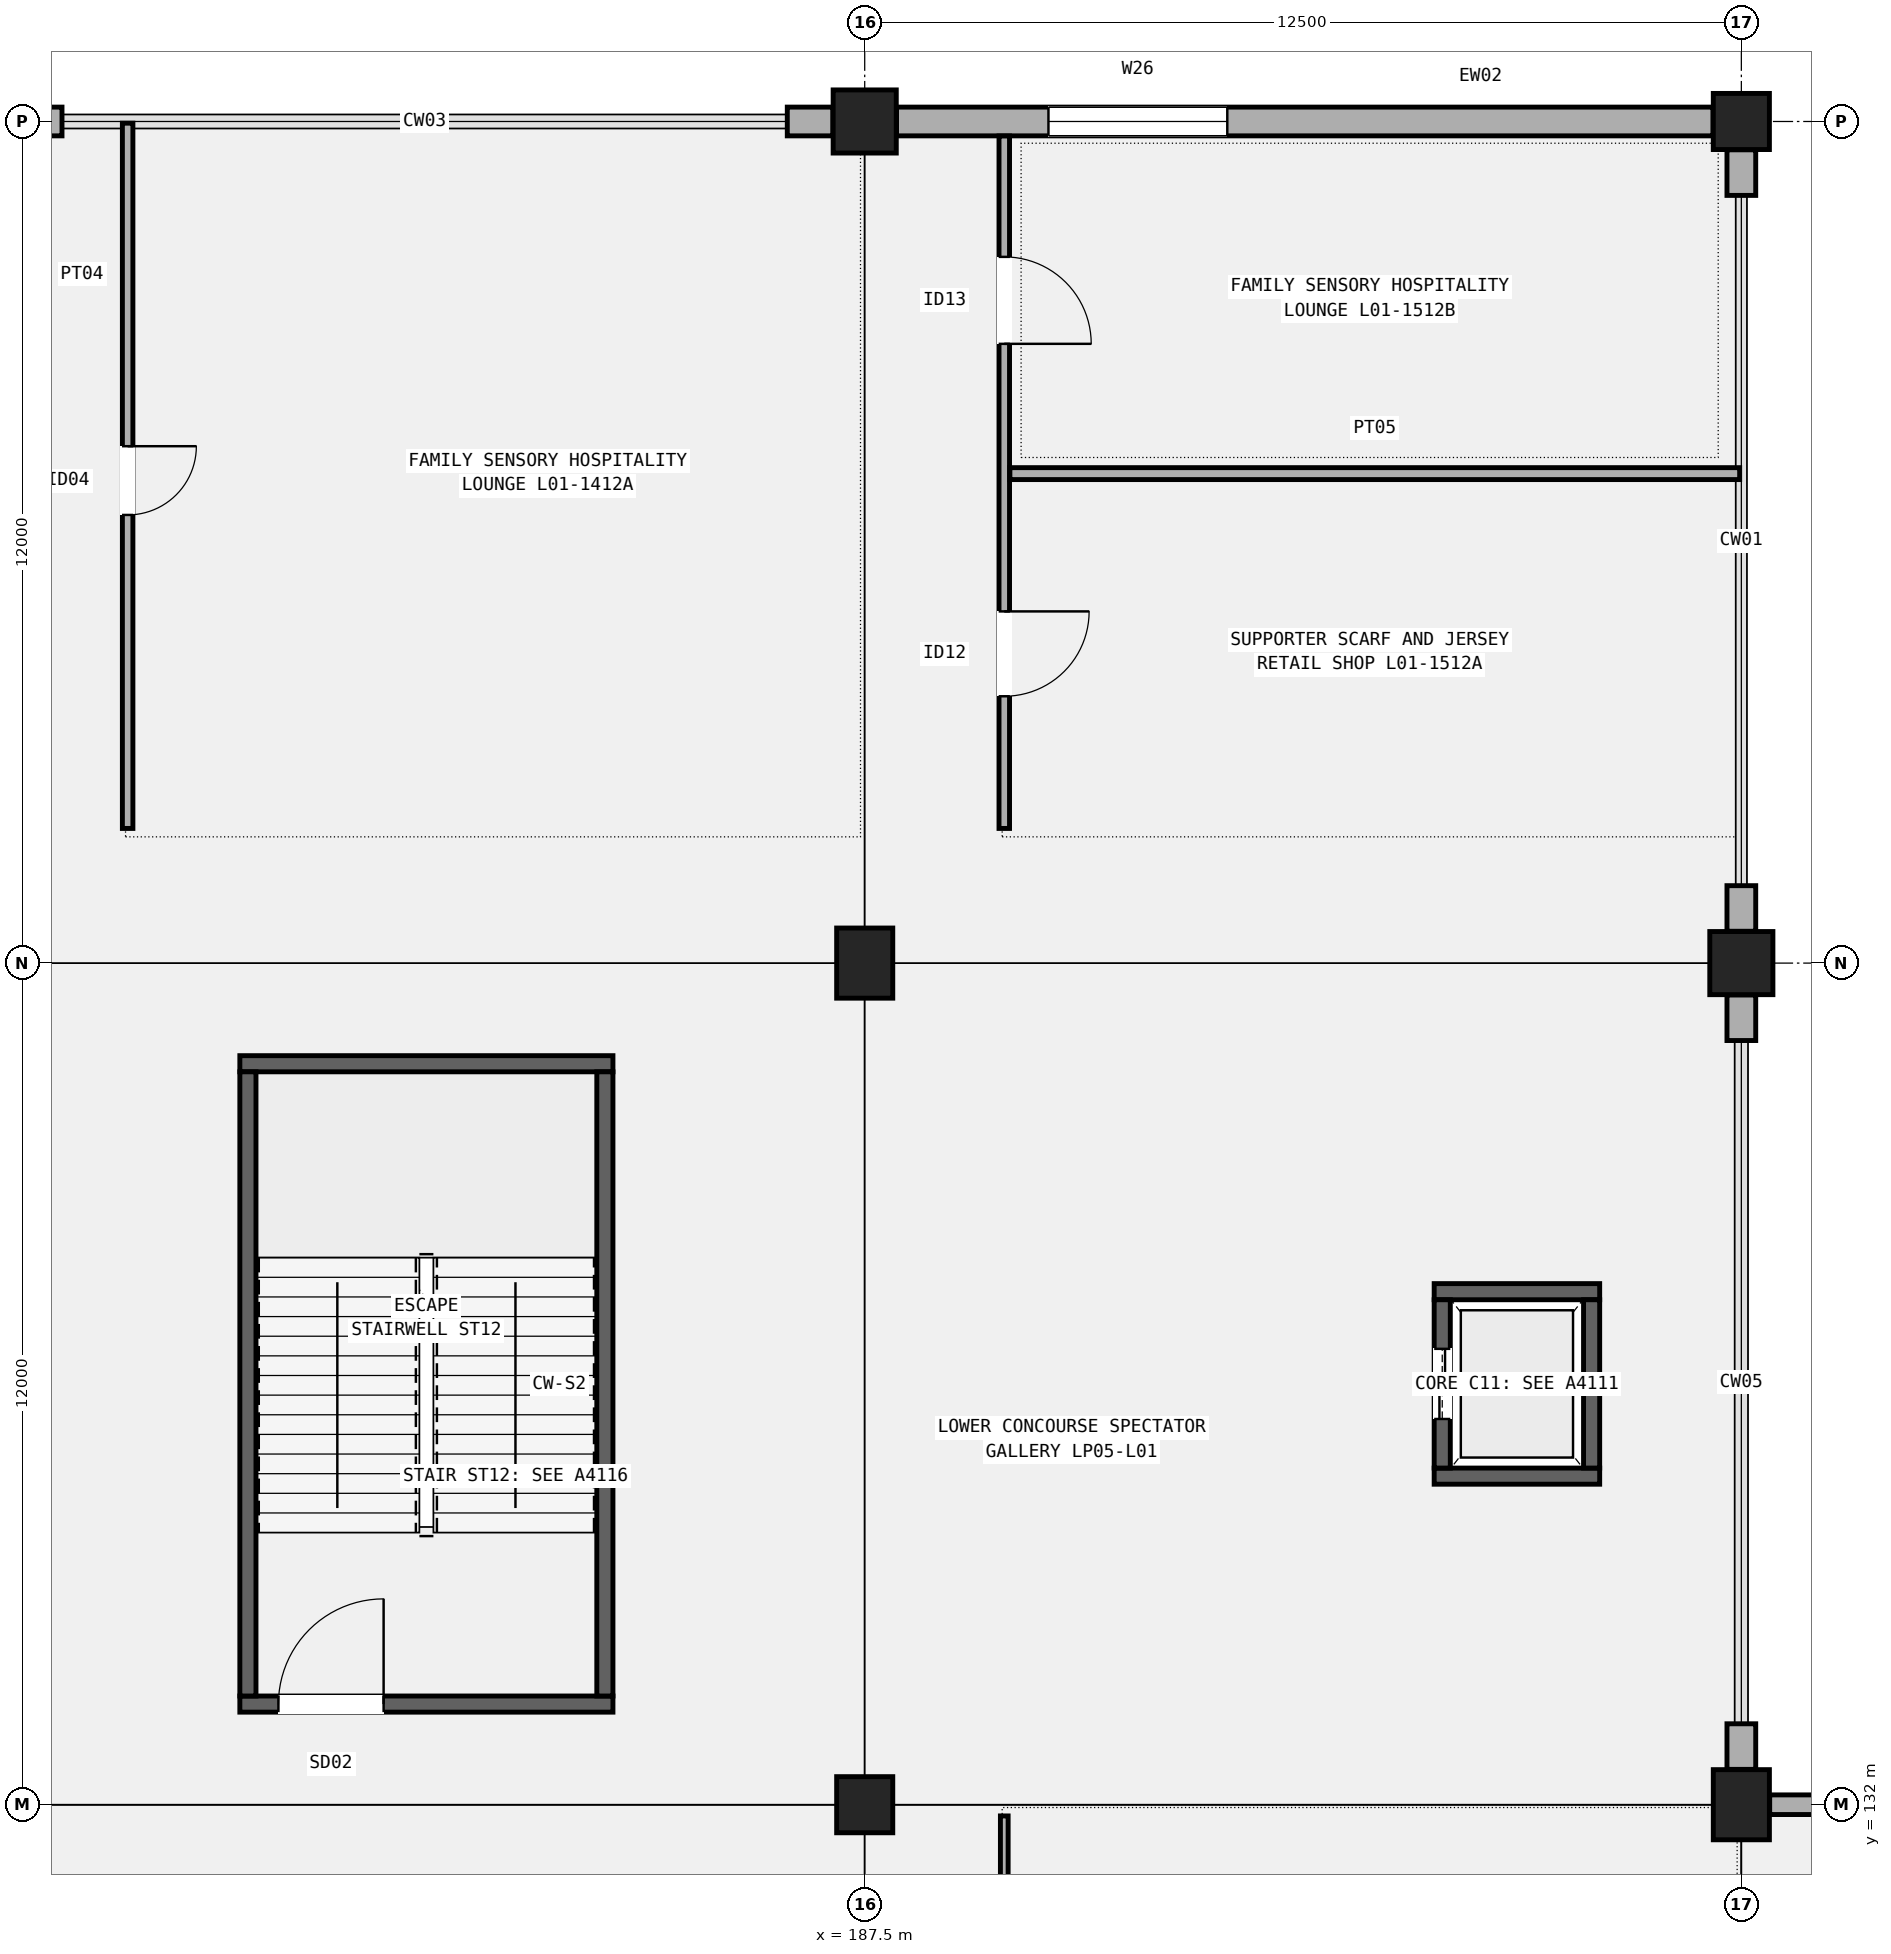
"""IFC4 building model, lengths in metres.
Left out: names, types, materials, properties, quantities, classifications, styles, units other than length and angle.
Written with IfcOpenShell. Run it as: python <this file> out.ifc"""

import sys

from ifc_helpers import new_model, si_unit, direction, frame, frame_2d, origin, origin_2d, place, context, subcontext, project, spatial, rectangle, extrude, element, fill, save


model = new_model("IFC4")
c1 = context("Model", 3, precision=1e-05, world=origin(), true_north=direction((0.0, 1.0)))
c2 = subcontext(c1, "Body", "Model", "MODEL_VIEW")
j1 = project(units=[si_unit("LENGTHUNIT", "METRE"), si_unit("PLANEANGLEUNIT", "RADIAN")], contexts=[c1])
p1 = place(None, origin())
s1 = spatial("IfcSite", under=j1, at=p1, CompositionType="ELEMENT")
p2 = place(p1, origin())
s2 = spatial("IfcBuilding", under=s1, at=p2, CompositionType="ELEMENT")
p3 = place(p2, frame((0.0, 0.0, 5.4)))
s3 = spatial("IfcBuildingStorey", under=s2, at=p3, CompositionType="ELEMENT", Elevation=5.4)
p4 = place(p3, frame((187.5, 132.0, 0.0), z_axis=(0.0, 0.0, 1.0), x_axis=(1.0, 0.0, 0.0)))
e1 = element("IfcColumn", 1, at=p4, inside=s3, PredefinedType="COLUMN", context=c2, shape_type="SweptSolid", body=[
    extrude(rectangle(XDim=0.8, YDim=0.8, at=origin_2d()), origin(), (0.0, 0.0, 1.0), 4.8),
])
p5 = place(p3, frame((187.5, 144.0, 0.0), z_axis=(0.0, 0.0, 1.0), x_axis=(1.0, 0.0, 0.0)))
e2 = element("IfcColumn", 2, at=p5, inside=s3, PredefinedType="COLUMN", context=c2, shape_type="SweptSolid", body=[
    extrude(rectangle(XDim=0.8, YDim=1.0, at=origin_2d()), origin(), (0.0, 0.0, 1.0), 4.8),
])
p6 = place(p3, frame((187.5, 156.0, 0.0), z_axis=(0.0, 0.0, 1.0), x_axis=(1.0, 0.0, 0.0)))
e3 = element("IfcColumn", 3, at=p6, inside=s3, PredefinedType="COLUMN", context=c2, shape_type="SweptSolid", body=[
    extrude(rectangle(XDim=0.9, YDim=0.9, at=origin_2d()), origin(), (0.0, 0.0, 1.0), 4.8),
])
p7 = place(p3, frame((200.0, 132.0, 0.0), z_axis=(0.0, 0.0, 1.0), x_axis=(1.0, 0.0, 0.0)))
e4 = element("IfcColumn", 4, at=p7, inside=s3, PredefinedType="COLUMN", context=c2, shape_type="SweptSolid", body=[
    extrude(rectangle(XDim=0.8, YDim=1.0, at=origin_2d()), origin(), (0.0, 0.0, 1.0), 4.8),
])
p8 = place(p3, frame((200.0, 144.0, 0.0), z_axis=(0.0, 0.0, 1.0), x_axis=(1.0, 0.0, 0.0)))
e5 = element("IfcColumn", 5, at=p8, inside=s3, PredefinedType="COLUMN", context=c2, shape_type="SweptSolid", body=[
    extrude(rectangle(XDim=0.9, YDim=0.9, at=origin_2d()), origin(), (0.0, 0.0, 1.0), 4.8),
])
p9 = place(p3, frame((200.0, 156.0, 0.0), z_axis=(0.0, 0.0, 1.0), x_axis=(1.0, 0.0, 0.0)))
e6 = element("IfcColumn", 6, at=p9, inside=s3, PredefinedType="COLUMN", context=c2, shape_type="SweptSolid", body=[
    extrude(rectangle(XDim=0.8, YDim=0.8, at=origin_2d()), origin(), (0.0, 0.0, 1.0), 4.8),
])
for number, where, z_axis, x_axis in (
    (7, (175.404, 156.0, 0.0), (0.0, 0.0, 1.0), (1.0, 0.0, 0.0)),
    (8, (186.396, 156.0, 0.0), (0.0, 0.0, 1.0), (1.0, 0.0, 0.0)),
):
    element("IfcWall", number, at=place(p3, frame(where, z_axis=z_axis, x_axis=x_axis)), inside=s3, PredefinedType="SOLIDWALL", context=c2, shape_type="SweptSolid", body=[
        extrude(rectangle(XDim=0.65, YDim=0.41, at=frame_2d((0.325, 0.0))), origin(), (0.0, 0.0, 1.0), 4.2),
    ])
p10 = place(p3, frame((200.0, 132.504, 0.0), z_axis=(0.0, 0.0, 1.0), x_axis=(0.0, 1.0, 0.0)))
e9 = element("IfcWall", 9, at=p10, inside=s3, PredefinedType="SOLIDWALL", context=c2, shape_type="SweptSolid", body=[
    extrude(rectangle(XDim=0.65, YDim=0.41, at=frame_2d((0.325, 0.0))), origin(), (0.0, 0.0, 1.0), 4.2),
])
p11 = place(p3, frame((200.0, 142.896, 0.0), z_axis=(0.0, 0.0, 1.0), x_axis=(0.0, 1.0, 0.0)))
e10 = element("IfcWall", 10, at=p11, inside=s3, PredefinedType="SOLIDWALL", context=c2, shape_type="SweptSolid", body=[
    extrude(rectangle(XDim=0.65, YDim=0.41, at=frame_2d((0.325, 0.0))), origin(), (0.0, 0.0, 1.0), 4.2),
])
p12 = place(p3, frame((187.954, 156.0, 0.0), z_axis=(0.0, 0.0, 1.0), x_axis=(1.0, 0.0, 0.0)))
e11 = element("IfcWall", 11, at=p12, inside=s3, PredefinedType="SOLIDWALL", context=c2, shape_type="SweptSolid", body=[
    extrude(rectangle(XDim=11.642, YDim=0.41, at=frame_2d((5.821, 0.0))), origin(), (0.0, 0.0, 1.0), 4.15),
])
p13 = place(p12, frame((2.166, 0.0, 0.95)))
e12 = element("IfcOpeningElement", 12, at=p13, cuts=e11, PredefinedType="OPENING", context=c2, shape_type="SweptSolid", body=[
    extrude(rectangle(XDim=2.55, YDim=1.95, at=frame_2d((1.275, 0.975))), frame((0.0, 0.215, 0.0), z_axis=(0.0, -1.0, 0.0), x_axis=(1.0, 0.0, 0.0)), (0.0, 0.0, 1.0), 0.43),
])
for number, where, z_axis, x_axis in (
    (13, (200.0, 144.454, 0.0), (0.0, 0.0, 1.0), (0.0, 1.0, 0.0)),
    (14, (200.0, 154.946, 0.0), (0.0, 0.0, 1.0), (0.0, 1.0, 0.0)),
):
    element("IfcWall", number, at=place(p3, frame(where, z_axis=z_axis, x_axis=x_axis)), inside=s3, PredefinedType="SOLIDWALL", context=c2, shape_type="SweptSolid", body=[
        extrude(rectangle(XDim=0.65, YDim=0.41, at=frame_2d((0.325, 0.0))), origin(), (0.0, 0.0, 1.0), 4.15),
    ])
p14 = place(p3, frame((200.404, 132.0, 0.0), z_axis=(0.0, 0.0, 1.0), x_axis=(1.0, 0.0, 0.0)))
e15 = element("IfcWall", 15, at=p14, inside=s3, PredefinedType="SOLIDWALL", context=c2, shape_type="SweptSolid", body=[
    extrude(rectangle(XDim=11.142, YDim=0.28, at=frame_2d((5.571, 0.0))), origin(), (0.0, 0.0, 1.0), 4.2),
])
p15 = place(p14, frame((2.216, 0.0, 0.95)))
e16 = element("IfcOpeningElement", 16, at=p15, cuts=e15, PredefinedType="OPENING", context=c2, shape_type="SweptSolid", body=[
    extrude(rectangle(XDim=3.0, YDim=2.15, at=frame_2d((1.5, 1.075))), frame((0.0, 0.15, 0.0), z_axis=(0.0, -1.0, 0.0), x_axis=(1.0, 0.0, 0.0)), (0.0, 0.0, 1.0), 0.3),
])
p16 = place(p3, frame((178.59, 133.435, 0.0), z_axis=(0.0, 0.0, 1.0), x_axis=(1.0, 0.0, 0.0)))
e17 = element("IfcWall", 17, at=p16, inside=s3, PredefinedType="SHEAR", context=c2, shape_type="SweptSolid", body=[
    extrude(rectangle(XDim=5.32, YDim=0.23, at=frame_2d((2.66, 0.0))), origin(), (0.0, 0.0, 1.0), 4.55),
])
p17 = place(p16, frame((0.55, 0.0, 0.0)))
e18 = element("IfcOpeningElement", 18, at=p17, cuts=e17, PredefinedType="OPENING", context=c2, shape_type="SweptSolid", body=[
    extrude(rectangle(XDim=1.5, YDim=2.2, at=frame_2d((0.75, 1.1))), frame((0.0, 0.125, 0.0), z_axis=(0.0, -1.0, 0.0), x_axis=(1.0, 0.0, 0.0)), (0.0, 0.0, 1.0), 0.25),
])
p18 = place(p3, frame((178.59, 142.565, 0.0), z_axis=(0.0, 0.0, 1.0), x_axis=(1.0, 0.0, 0.0)))
e19 = element("IfcWall", 19, at=p18, inside=s3, PredefinedType="SHEAR", context=c2, shape_type="SweptSolid", body=[
    extrude(rectangle(XDim=5.32, YDim=0.23, at=frame_2d((2.66, 0.0))), origin(), (0.0, 0.0, 1.0), 4.55),
])
for number, where, z_axis, x_axis in (
    (20, (178.705, 133.55, 0.0), (0.0, 0.0, 1.0), (0.0, 1.0, 0.0)),
    (21, (183.795, 133.55, 0.0), (0.0, 0.0, 1.0), (0.0, 1.0, 0.0)),
):
    element("IfcWall", number, at=place(p3, frame(where, z_axis=z_axis, x_axis=x_axis)), inside=s3, PredefinedType="SHEAR", context=c2, shape_type="SweptSolid", body=[
        extrude(rectangle(XDim=8.9, YDim=0.23, at=frame_2d((4.45, 0.0))), origin(), (0.0, 0.0, 1.0), 4.55),
    ])
for number, where, z_axis, x_axis in (
    (22, (195.62, 136.685, 0.0), (0.0, 0.0, 1.0), (1.0, 0.0, 0.0)),
    (23, (195.62, 139.315, 0.0), (0.0, 0.0, 1.0), (1.0, 0.0, 0.0)),
):
    element("IfcWall", number, at=place(p3, frame(where, z_axis=z_axis, x_axis=x_axis)), inside=s3, PredefinedType="SHEAR", context=c2, shape_type="SweptSolid", body=[
        extrude(rectangle(XDim=2.36, YDim=0.23, at=frame_2d((1.18, 0.0))), origin(), (0.0, 0.0, 1.0), 4.55),
    ])
p19 = place(p3, frame((195.735, 136.8, 0.0), z_axis=(0.0, 0.0, 1.0), x_axis=(0.0, 1.0, 0.0)))
e24 = element("IfcWall", 24, at=p19, inside=s3, PredefinedType="SHEAR", context=c2, shape_type="SweptSolid", body=[
    extrude(rectangle(XDim=2.4, YDim=0.23, at=frame_2d((1.2, 0.0))), origin(), (0.0, 0.0, 1.0), 4.55),
])
p20 = place(p19, frame((0.7, 0.0, 0.0)))
e25 = element("IfcOpeningElement", 25, at=p20, cuts=e24, PredefinedType="OPENING", context=c2, shape_type="SweptSolid", body=[
    extrude(rectangle(XDim=1.0, YDim=2.15, at=frame_2d((0.5, 1.075))), frame((0.0, 0.125, 0.0), z_axis=(0.0, -1.0, 0.0), x_axis=(1.0, 0.0, 0.0)), (0.0, 0.0, 1.0), 0.25),
])
p21 = place(p3, frame((197.865, 136.8, 0.0), z_axis=(0.0, 0.0, 1.0), x_axis=(0.0, 1.0, 0.0)))
e26 = element("IfcWall", 26, at=p21, inside=s3, PredefinedType="SHEAR", context=c2, shape_type="SweptSolid", body=[
    extrude(rectangle(XDim=2.4, YDim=0.23, at=frame_2d((1.2, 0.0))), origin(), (0.0, 0.0, 1.0), 4.55),
])
p22 = place(p3, frame((176.99, 145.92, 0.0), z_axis=(0.0, 0.0, 1.0), x_axis=(0.0, 1.0, 0.0)))
e27 = element("IfcWall", 27, at=p22, inside=s3, PredefinedType="PARTITIONING", context=c2, shape_type="SweptSolid", body=[
    extrude(rectangle(XDim=10.056, YDim=0.15, at=frame_2d((5.028, 0.0))), origin(), (0.0, 0.0, 1.0), 3.92),
])
p23 = place(p22, frame((5.45, 0.0, 0.0), z_axis=(0.0, 0.0, 1.0), x_axis=(-1.0, 0.0, 0.0)))
e28 = element("IfcOpeningElement", 28, at=p23, cuts=e27, PredefinedType="OPENING", context=c2, shape_type="SweptSolid", body=[
    extrude(rectangle(XDim=0.98, YDim=2.1, at=frame_2d((0.49, 1.05))), frame((0.0, 0.085, 0.0), z_axis=(0.0, -1.0, 0.0), x_axis=(1.0, 0.0, 0.0)), (0.0, 0.0, 1.0), 0.17),
])
p24 = place(p3, frame((189.49, 120.16, 0.0), z_axis=(0.0, 0.0, 1.0), x_axis=(0.0, 1.0, 0.0)))
e29 = element("IfcWall", 29, at=p24, inside=s3, PredefinedType="PARTITIONING", context=c2, shape_type="SweptSolid", body=[
    extrude(rectangle(XDim=11.68, YDim=0.11, at=frame_2d((5.84, 0.0))), origin(), (0.0, 0.0, 1.0), 3.92),
])
p25 = place(p24, frame((6.43, 0.0, 0.0), z_axis=(0.0, 0.0, 1.0), x_axis=(-1.0, 0.0, 0.0)))
e30 = element("IfcOpeningElement", 30, at=p25, cuts=e29, PredefinedType="OPENING", context=c2, shape_type="SweptSolid", body=[
    extrude(rectangle(XDim=1.18, YDim=2.2, at=frame_2d((0.59, 1.1))), frame((0.0, 0.065, 0.0), z_axis=(0.0, -1.0, 0.0), x_axis=(1.0, 0.0, 0.0)), (0.0, 0.0, 1.0), 0.13),
])
p26 = place(p3, frame((189.49, 145.92, 0.0), z_axis=(0.0, 0.0, 1.0), x_axis=(0.0, 1.0, 0.0)))
e31 = element("IfcWall", 31, at=p26, inside=s3, PredefinedType="PARTITIONING", context=c2, shape_type="SweptSolid", body=[
    extrude(rectangle(XDim=9.873, YDim=0.15, at=frame_2d((4.937, 0.0))), origin(), (0.0, 0.0, 1.0), 3.92),
])
p27 = place(p26, frame((3.094, 0.0, 0.0), z_axis=(0.0, 0.0, 1.0), x_axis=(-1.0, 0.0, 0.0)))
e32 = element("IfcOpeningElement", 32, at=p27, cuts=e31, PredefinedType="OPENING", context=c2, shape_type="SweptSolid", body=[
    extrude(rectangle(XDim=1.21, YDim=2.18, at=frame_2d((0.605, 1.09))), frame((0.0, 0.085, 0.0), z_axis=(0.0, -1.0, 0.0), x_axis=(1.0, 0.0, 0.0)), (0.0, 0.0, 1.0), 0.17),
])
p28 = place(p26, frame((8.15, 0.0, 0.0), z_axis=(0.0, 0.0, 1.0), x_axis=(-1.0, 0.0, 0.0)))
e33 = element("IfcOpeningElement", 33, at=p28, cuts=e31, PredefinedType="OPENING", context=c2, shape_type="SweptSolid", body=[
    extrude(rectangle(XDim=1.24, YDim=2.22, at=frame_2d((0.62, 1.11))), frame((0.0, 0.085, 0.0), z_axis=(0.0, -1.0, 0.0), x_axis=(1.0, 0.0, 0.0)), (0.0, 0.0, 1.0), 0.17),
])
p29 = place(p3, frame((189.57, 150.979, 0.0), z_axis=(0.0, 0.0, 1.0), x_axis=(1.0, 0.0, 0.0)))
e34 = element("IfcWall", 34, at=p29, inside=s3, PredefinedType="PARTITIONING", context=c2, shape_type="SweptSolid", body=[
    extrude(rectangle(XDim=10.406, YDim=0.17, at=frame_2d((5.203, 0.0))), origin(), (0.0, 0.0, 1.0), 3.92),
])
p30 = place(p13, origin())
e35 = element("IfcWindow", 35, at=p30, inside=s3, PartitioningType="SINGLE_PANEL", PredefinedType="WINDOW", context=c2, shape_type="SweptSolid", body=[
    extrude(rectangle(XDim=2.55, YDim=1.95, at=frame_2d((1.275, 0.975))), frame((0.0, 0.03, 0.0), z_axis=(0.0, -1.0, 0.0), x_axis=(1.0, 0.0, 0.0)), (0.0, 0.0, 1.0), 0.06),
])
fill(e12, e35)
p31 = place(p17, origin())
e36 = element("IfcDoor", 36, at=p31, inside=s3, OperationType="SINGLE_SWING_RIGHT", PredefinedType="DOOR", context=c2, shape_type="SweptSolid", body=[
    extrude(rectangle(XDim=1.5, YDim=2.2, at=frame_2d((0.75, 1.1))), frame((0.0, 0.025, 0.0), z_axis=(0.0, -1.0, 0.0), x_axis=(1.0, 0.0, 0.0)), (0.0, 0.0, 1.0), 0.05),
])
fill(e18, e36)
p32 = place(p20, origin())
e37 = element("IfcDoor", 37, at=p32, inside=s3, OperationType="DOUBLE_DOOR_SLIDING", PredefinedType="DOOR", context=c2, shape_type="SweptSolid", body=[
    extrude(rectangle(XDim=1.0, YDim=2.15, at=frame_2d((0.5, 1.075))), frame((0.0, 0.025, 0.0), z_axis=(0.0, -1.0, 0.0), x_axis=(1.0, 0.0, 0.0)), (0.0, 0.0, 1.0), 0.05),
])
fill(e25, e37)
p33 = place(p23, origin())
e38 = element("IfcDoor", 38, at=p33, inside=s3, OperationType="SINGLE_SWING_LEFT", PredefinedType="DOOR", context=c2, shape_type="SweptSolid", body=[
    extrude(rectangle(XDim=0.98, YDim=2.1, at=frame_2d((0.49, 1.05))), frame((0.0, 0.025, 0.0), z_axis=(0.0, -1.0, 0.0), x_axis=(1.0, 0.0, 0.0)), (0.0, 0.0, 1.0), 0.05),
])
fill(e28, e38)
p34 = place(p27, origin())
e39 = element("IfcDoor", 39, at=p34, inside=s3, OperationType="SINGLE_SWING_LEFT", PredefinedType="DOOR", context=c2, shape_type="SweptSolid", body=[
    extrude(rectangle(XDim=1.21, YDim=2.18, at=frame_2d((0.605, 1.09))), frame((0.0, 0.025, 0.0), z_axis=(0.0, -1.0, 0.0), x_axis=(1.0, 0.0, 0.0)), (0.0, 0.0, 1.0), 0.05),
])
fill(e32, e39)
p35 = place(p28, origin())
e40 = element("IfcDoor", 40, at=p35, inside=s3, OperationType="SINGLE_SWING_RIGHT", PredefinedType="DOOR", context=c2, shape_type="SweptSolid", body=[
    extrude(rectangle(XDim=1.24, YDim=2.22, at=frame_2d((0.62, 1.11))), frame((0.0, 0.025, 0.0), z_axis=(0.0, -1.0, 0.0), x_axis=(1.0, 0.0, 0.0)), (0.0, 0.0, 1.0), 0.05),
])
fill(e33, e40)
save(model, sys.argv[1])
